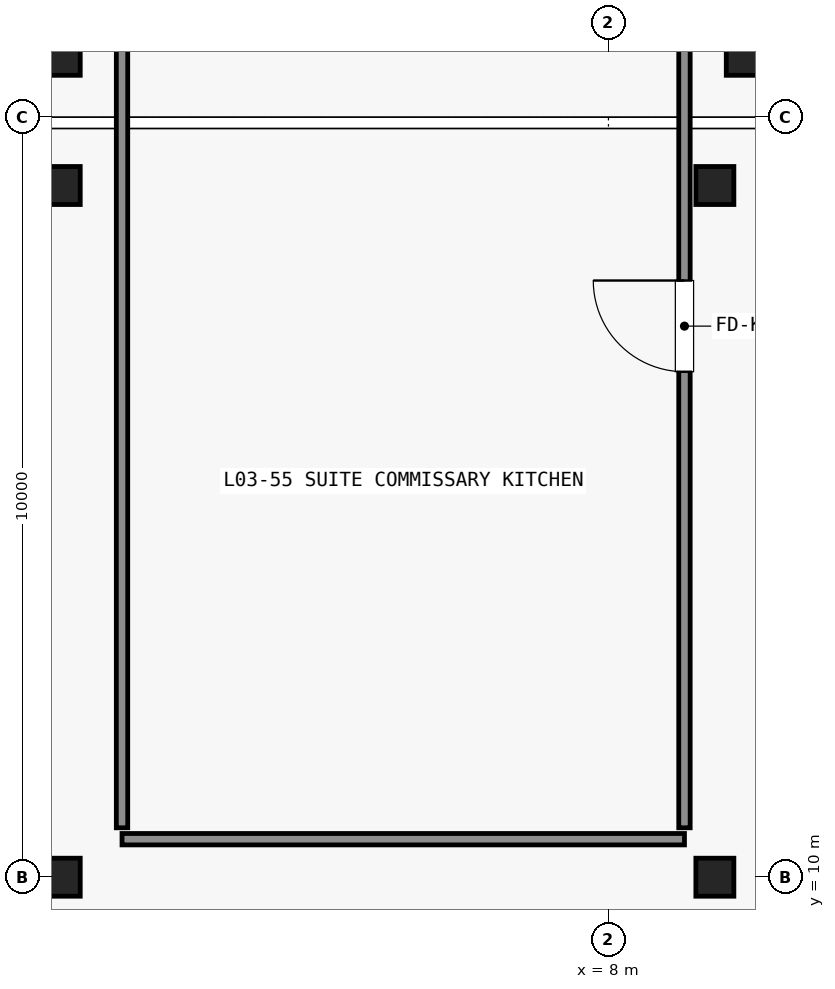
"""IFC4 building model, lengths in metres.
Left out: names, types, materials, properties, quantities, classifications, styles, units other than length and angle.
Written with IfcOpenShell. Run it as: python <this file> out.ifc"""

import sys

from ifc_helpers import new_model, si_unit, direction, frame, frame_2d, origin, origin_2d, place, context, subcontext, project, spatial, rectangle, extrude, element, fill, save


model = new_model("IFC4")
c1 = context("Model", 3, precision=1e-05, world=origin(), true_north=direction((0.0, 1.0)))
c2 = subcontext(c1, "Body", "Model", "MODEL_VIEW")
j1 = project(units=[si_unit("LENGTHUNIT", "METRE"), si_unit("PLANEANGLEUNIT", "RADIAN")], contexts=[c1])
p1 = place(None, origin())
s1 = spatial("IfcSite", under=j1, at=p1, CompositionType="ELEMENT")
p2 = place(p1, origin())
s2 = spatial("IfcBuilding", under=s1, at=p2, CompositionType="ELEMENT")
p3 = place(p2, frame((0.0, 0.0, 16.2)))
s3 = spatial("IfcBuildingStorey", under=s2, at=p3, CompositionType="ELEMENT", Elevation=16.2)
for number, where, z_axis, x_axis in (
    (1, (0.8, 10.0, 0.0), (0.0, 0.0, 1.0), (1.0, 0.0, 0.0)),
    (2, (0.8, 19.1, 0.0), (0.0, 0.0, 1.0), (1.0, 0.0, 0.0)),
    (3, (9.4, 10.0, 0.0), (0.0, 0.0, 1.0), (1.0, 0.0, 0.0)),
    (4, (9.4, 19.1, 0.0), (0.0, 0.0, 1.0), (1.0, 0.0, 0.0)),
    (5, (0.8, 20.8, 0.0), (0.0, 0.0, 1.0), (1.0, 0.0, 0.0)),
    (6, (9.8, 20.8, 0.0), (0.0, 0.0, 1.0), (1.0, 0.0, 0.0)),
):
    element("IfcColumn", number, at=place(p3, frame(where, z_axis=z_axis, x_axis=x_axis)), inside=s3, PredefinedType="COLUMN", context=c2, shape_type="SweptSolid", body=[
        extrude(rectangle(XDim=0.5, YDim=0.5, at=origin_2d()), origin(), (0.0, 0.0, 1.0), 4.8),
    ])
p4 = place(p3, frame((1.6, 10.5, 0.0), z_axis=(0.0, 0.0, 1.0), x_axis=(1.0, 0.0, 0.0)))
e7 = element("IfcWall", 7, at=p4, inside=s3, PredefinedType="STANDARD", context=c2, shape_type="SweptSolid", body=[
    extrude(rectangle(XDim=7.4, YDim=0.15, at=frame_2d((3.7, 0.0))), origin(), (0.0, 0.0, 1.0), 3.69),
])
p5 = place(p3, frame((1.6, 10.65, 0.0), z_axis=(0.0, 0.0, 1.0), x_axis=(0.0, 1.0, 0.0)))
e8 = element("IfcWall", 8, at=p5, inside=s3, PredefinedType="STANDARD", context=c2, shape_type="SweptSolid", body=[
    extrude(rectangle(XDim=13.2, YDim=0.15, at=frame_2d((6.6, 0.0))), origin(), (0.0, 0.0, 1.0), 3.69),
])
p6 = place(p3, frame((9.0, 10.65, 0.0), z_axis=(0.0, 0.0, 1.0), x_axis=(0.0, 1.0, 0.0)))
e9 = element("IfcWall", 9, at=p6, inside=s3, PredefinedType="STANDARD", context=c2, shape_type="SweptSolid", body=[
    extrude(rectangle(XDim=13.2, YDim=0.15, at=frame_2d((6.6, 0.0))), origin(), (0.0, 0.0, 1.0), 3.69),
])
p7 = place(p6, frame((6.0, 0.0, 0.0)))
e10 = element("IfcOpeningElement", 10, at=p7, cuts=e9, PredefinedType="OPENING", context=c2, shape_type="SweptSolid", body=[
    extrude(rectangle(XDim=1.2, YDim=2.2, at=frame_2d((0.6, 1.1))), frame((0.0, 0.085, 0.0), z_axis=(0.0, -1.0, 0.0), x_axis=(1.0, 0.0, 0.0)), (0.0, 0.0, 1.0), 0.17),
])
p8 = place(p7, origin())
e11 = element("IfcDoor", 11, at=p8, inside=s3, OperationType="SINGLE_SWING_RIGHT", PredefinedType="DOOR", context=c2, shape_type="SweptSolid", body=[
    extrude(rectangle(XDim=1.2, YDim=2.2, at=frame_2d((0.6, 1.1))), frame((0.0, 0.025, 0.0), z_axis=(0.0, -1.0, 0.0), x_axis=(1.0, 0.0, 0.0)), (0.0, 0.0, 1.0), 0.05),
])
fill(e10, e11)
save(model, sys.argv[1])
